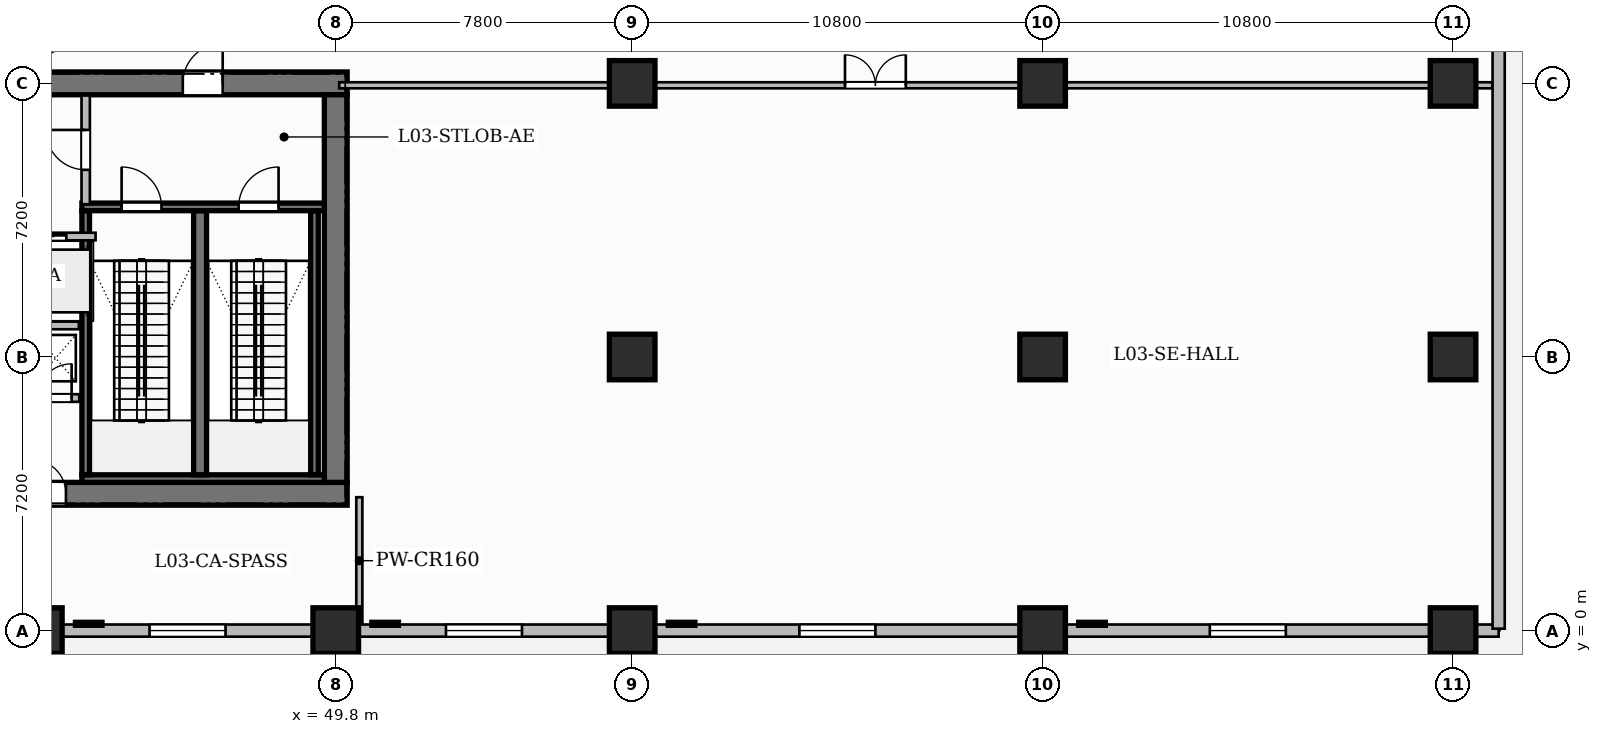
"""IFC4 building model, lengths in metres.
Left out: names, types, materials, properties, quantities, classifications, styles, units other than length and angle.
Written with IfcOpenShell. Run it as: python <this file> out.ifc"""

import sys

from ifc_helpers import new_model, si_unit, direction, frame, frame_2d, origin, origin_2d, place, context, subcontext, project, spatial, rectangle, extrude, source, transform, mapped, element, fill, save


model = new_model("IFC4")
c1 = context("Model", 3, precision=1e-05, world=origin(), true_north=direction((0.0, 1.0)))
c2 = subcontext(c1, "Body", "Model", "MODEL_VIEW")
j1 = project(units=[si_unit("LENGTHUNIT", "METRE"), si_unit("PLANEANGLEUNIT", "RADIAN")], contexts=[c1])
p1 = place(None, origin())
s1 = spatial("IfcSite", under=j1, at=p1, CompositionType="ELEMENT")
p2 = place(p1, origin())
s2 = spatial("IfcBuilding", under=s1, at=p2, CompositionType="ELEMENT")
p3 = place(p2, frame((0.0, 0.0, 16.2)))
s3 = spatial("IfcBuildingStorey", under=s2, at=p3, CompositionType="ELEMENT", Elevation=16.2)
p4 = place(p3, frame((34.5, 3.6, 0.0), z_axis=(0.0, 0.0, 1.0), x_axis=(1.0, 0.0, 0.0)))
e1 = element("IfcWall", 1, at=p4, inside=s3, PredefinedType="SHEAR", context=c2, shape_type="SweptSolid", body=[
    extrude(rectangle(XDim=15.6, YDim=0.6, at=frame_2d((7.8, 0.0))), origin(), (0.0, 0.0, 1.0), 5.4),
])
p5 = place(p4, frame((4.13, 0.0, 0.0)))
e2 = element("IfcOpeningElement", 2, at=p5, cuts=e1, PredefinedType="OPENING", context=c2, shape_type="SweptSolid", body=[
    extrude(rectangle(XDim=0.9, YDim=2.1, at=frame_2d((0.45, 1.05))), frame((0.0, 0.31, 0.0), z_axis=(0.0, -1.0, 0.0), x_axis=(1.0, 0.0, 0.0)), (0.0, 0.0, 1.0), 0.62),
])
p6 = place(p4, frame((5.7, 0.0, 0.0)))
e3 = element("IfcOpeningElement", 3, at=p6, cuts=e1, PredefinedType="OPENING", context=c2, shape_type="SweptSolid", body=[
    extrude(rectangle(XDim=0.9, YDim=2.1, at=frame_2d((0.45, 1.05))), frame((0.0, 0.31, 0.0), z_axis=(0.0, -1.0, 0.0), x_axis=(1.0, 0.0, 0.0)), (0.0, 0.0, 1.0), 0.62),
])
p7 = place(p4, frame((7.3, 0.0, 0.0)))
e4 = element("IfcOpeningElement", 4, at=p7, cuts=e1, PredefinedType="OPENING", context=c2, shape_type="SweptSolid", body=[
    extrude(rectangle(XDim=0.9, YDim=2.1, at=frame_2d((0.45, 1.05))), frame((0.0, 0.31, 0.0), z_axis=(0.0, -1.0, 0.0), x_axis=(1.0, 0.0, 0.0)), (0.0, 0.0, 1.0), 0.62),
])
p8 = place(p3, frame((34.5, 14.4, 0.0), z_axis=(0.0, 0.0, 1.0), x_axis=(1.0, 0.0, 0.0)))
e5 = element("IfcWall", 5, at=p8, inside=s3, PredefinedType="SHEAR", context=c2, shape_type="SweptSolid", body=[
    extrude(rectangle(XDim=15.6, YDim=0.6, at=frame_2d((7.8, 0.0))), origin(), (0.0, 0.0, 1.0), 5.4),
])
p9 = place(p8, frame((5.43, 0.0, 0.0)))
e6 = element("IfcOpeningElement", 6, at=p9, cuts=e5, PredefinedType="OPENING", context=c2, shape_type="SweptSolid", body=[
    extrude(rectangle(XDim=1.5, YDim=2.2, at=frame_2d((0.75, 1.1))), frame((0.0, 0.31, 0.0), z_axis=(0.0, -1.0, 0.0), x_axis=(1.0, 0.0, 0.0)), (0.0, 0.0, 1.0), 0.62),
])
p10 = place(p8, frame((1.645, 0.0, 0.0)))
e7 = element("IfcOpeningElement", 7, at=p10, cuts=e5, PredefinedType="OPENING", context=c2, shape_type="SweptSolid", body=[
    extrude(rectangle(XDim=1.05, YDim=2.15, at=frame_2d((0.525, 1.075))), frame((0.0, 0.31, 0.0), z_axis=(0.0, -1.0, 0.0), x_axis=(1.0, 0.0, 0.0)), (0.0, 0.0, 1.0), 0.62),
])
p11 = place(p8, frame((11.275, 0.0, 0.0)))
e8 = element("IfcOpeningElement", 8, at=p11, cuts=e5, PredefinedType="OPENING", context=c2, shape_type="SweptSolid", body=[
    extrude(rectangle(XDim=1.05, YDim=2.15, at=frame_2d((0.525, 1.075))), frame((0.0, 0.31, 0.0), z_axis=(0.0, -1.0, 0.0), x_axis=(1.0, 0.0, 0.0)), (0.0, 0.0, 1.0), 0.62),
])
p12 = place(p3, frame((49.8, 3.9, 0.0), z_axis=(0.0, 0.0, 1.0), x_axis=(0.0, 1.0, 0.0)))
e9 = element("IfcWall", 9, at=p12, inside=s3, PredefinedType="SHEAR", context=c2, shape_type="SweptSolid", body=[
    extrude(rectangle(XDim=10.2, YDim=0.6, at=frame_2d((5.1, 0.0))), origin(), (0.0, 0.0, 1.0), 5.4),
])
m1 = source(origin(), c2, "Body", "SweptSolid", [
    extrude(rectangle(XDim=1.2, YDim=1.2, at=origin_2d()), origin(), (0.0, 0.0, 1.0), 5.4),
])
for number, where, z_axis, x_axis in (
    (10, (42.0, 0.0, 0.0), (0.0, 0.0, 1.0), (1.0, 0.0, 0.0)),
    (11, (49.8, 0.0, 0.0), (0.0, 0.0, 1.0), (1.0, 0.0, 0.0)),
    (12, (57.6, 0.0, 0.0), (0.0, 0.0, 1.0), (1.0, 0.0, 0.0)),
    (13, (57.6, 7.2, 0.0), (0.0, 0.0, 1.0), (1.0, 0.0, 0.0)),
    (14, (57.6, 14.4, 0.0), (0.0, 0.0, 1.0), (1.0, 0.0, 0.0)),
    (15, (68.4, 0.0, 0.0), (0.0, 0.0, 1.0), (1.0, 0.0, 0.0)),
    (16, (68.4, 7.2, 0.0), (0.0, 0.0, 1.0), (1.0, 0.0, 0.0)),
    (17, (68.4, 14.4, 0.0), (0.0, 0.0, 1.0), (1.0, 0.0, 0.0)),
    (18, (79.2, 0.0, 0.0), (0.0, 0.0, 1.0), (1.0, 0.0, 0.0)),
    (19, (79.2, 7.2, 0.0), (0.0, 0.0, 1.0), (1.0, 0.0, 0.0)),
    (20, (79.2, 14.4, 0.0), (0.0, 0.0, 1.0), (1.0, 0.0, 0.0)),
):
    element("IfcColumn", number, at=place(p3, frame(where, z_axis=z_axis, x_axis=x_axis)), inside=s3, PredefinedType="COLUMN", context=c2, shape_type="MappedRepresentation", body=[
        mapped(m1, transform((0.0, 0.0, 0.0), scale=1.0)),
    ])
p13 = place(p3, frame((43.12, 4.0, 0.0), z_axis=(0.0, 0.0, 1.0), x_axis=(1.0, 0.0, 0.0)))
e21 = element("IfcWall", 21, at=p13, inside=s3, PredefinedType="SHEAR", context=c2, shape_type="SweptSolid", body=[
    extrude(rectangle(XDim=6.38, YDim=0.2, at=frame_2d((3.19, 0.0))), origin(), (0.0, 0.0, 1.0), 5.4),
])
p14 = place(p3, frame((43.22, 4.1, 0.0), z_axis=(0.0, 0.0, 1.0), x_axis=(0.0, 1.0, 0.0)))
e22 = element("IfcWall", 22, at=p14, inside=s3, PredefinedType="SHEAR", context=c2, shape_type="SweptSolid", body=[
    extrude(rectangle(XDim=6.95, YDim=0.2, at=frame_2d((3.475, 0.0))), origin(), (0.0, 0.0, 1.0), 5.4),
])
p15 = place(p3, frame((46.23, 4.1, 0.0), z_axis=(0.0, 0.0, 1.0), x_axis=(0.0, 1.0, 0.0)))
e23 = element("IfcWall", 23, at=p15, inside=s3, PredefinedType="SHEAR", context=c2, shape_type="SweptSolid", body=[
    extrude(rectangle(XDim=6.95, YDim=0.34, at=frame_2d((3.475, 0.0))), origin(), (0.0, 0.0, 1.0), 5.4),
])
p16 = place(p3, frame((49.24, 4.1, 0.0), z_axis=(0.0, 0.0, 1.0), x_axis=(0.0, 1.0, 0.0)))
e24 = element("IfcWall", 24, at=p16, inside=s3, PredefinedType="SHEAR", context=c2, shape_type="SweptSolid", body=[
    extrude(rectangle(XDim=6.95, YDim=0.2, at=frame_2d((3.475, 0.0))), origin(), (0.0, 0.0, 1.0), 5.4),
])
p17 = place(p3, frame((43.12, 11.15, 0.0), z_axis=(0.0, 0.0, 1.0), x_axis=(1.0, 0.0, 0.0)))
e25 = element("IfcWall", 25, at=p17, inside=s3, PredefinedType="SHEAR", context=c2, shape_type="SweptSolid", body=[
    extrude(rectangle(XDim=6.38, YDim=0.2, at=frame_2d((3.19, 0.0))), origin(), (0.0, 0.0, 1.0), 5.4),
])
p18 = place(p17, frame((1.045, 0.0, 0.0)))
e26 = element("IfcOpeningElement", 26, at=p18, cuts=e25, PredefinedType="OPENING", context=c2, shape_type="SweptSolid", body=[
    extrude(rectangle(XDim=1.05, YDim=2.2, at=frame_2d((0.525, 1.1))), frame((0.0, 0.11, 0.0), z_axis=(0.0, -1.0, 0.0), x_axis=(1.0, 0.0, 0.0)), (0.0, 0.0, 1.0), 0.22),
])
p19 = place(p17, frame((4.125, 0.0, 0.0)))
e27 = element("IfcOpeningElement", 27, at=p19, cuts=e25, PredefinedType="OPENING", context=c2, shape_type="SweptSolid", body=[
    extrude(rectangle(XDim=1.05, YDim=2.2, at=frame_2d((0.525, 1.1))), frame((0.0, 0.11, 0.0), z_axis=(0.0, -1.0, 0.0), x_axis=(1.0, 0.0, 0.0)), (0.0, 0.0, 1.0), 0.22),
])
p20 = place(p3, frame((38.3, 8.03, 0.0), z_axis=(0.0, 0.0, 1.0), x_axis=(1.0, 0.0, 0.0)))
e28 = element("IfcWall", 28, at=p20, inside=s3, PredefinedType="PARTITIONING", context=c2, shape_type="SweptSolid", body=[
    extrude(rectangle(XDim=4.74, YDim=0.2, at=frame_2d((2.37, 0.0))), origin(), (0.0, 0.0, 1.0), 5.1),
])
p21 = place(p3, frame((43.22, 11.22, 0.0), z_axis=(0.0, 0.0, 1.0), x_axis=(0.0, 1.0, 0.0)))
e29 = element("IfcWall", 29, at=p21, inside=s3, PredefinedType="PARTITIONING", context=c2, shape_type="SweptSolid", body=[
    extrude(rectangle(XDim=2.86, YDim=0.22, at=frame_2d((1.43, 0.0))), origin(), (0.0, 0.0, 1.0), 5.1),
])
p22 = place(p21, frame((0.905, 0.0, 0.0)))
e30 = element("IfcOpeningElement", 30, at=p22, cuts=e29, PredefinedType="OPENING", context=c2, shape_type="SweptSolid", body=[
    extrude(rectangle(XDim=1.05, YDim=2.15, at=frame_2d((0.525, 1.075))), frame((0.0, 0.12, 0.0), z_axis=(0.0, -1.0, 0.0), x_axis=(1.0, 0.0, 0.0)), (0.0, 0.0, 1.0), 0.24),
])
p23 = place(p3, frame((41.73, 6.12, 0.0), z_axis=(0.0, 0.0, 1.0), x_axis=(1.0, 0.0, 0.0)))
e31 = element("IfcWall", 31, at=p23, inside=s3, PredefinedType="PARTITIONING", context=c2, shape_type="SweptSolid", body=[
    extrude(rectangle(XDim=1.32, YDim=0.2, at=frame_2d((0.66, 0.0))), origin(), (0.0, 0.0, 1.0), 5.1),
])
p24 = place(p23, frame((0.22, 0.0, 0.0)))
e32 = element("IfcOpeningElement", 32, at=p24, cuts=e31, PredefinedType="OPENING", context=c2, shape_type="SweptSolid", body=[
    extrude(rectangle(XDim=0.9, YDim=2.1, at=frame_2d((0.45, 1.05))), frame((0.0, 0.11, 0.0), z_axis=(0.0, -1.0, 0.0), x_axis=(1.0, 0.0, 0.0)), (0.0, 0.0, 1.0), 0.22),
])
p25 = place(p3, frame((49.89, 14.35, 0.0), z_axis=(0.0, 0.0, 1.0), x_axis=(1.0, 0.0, 0.0)))
e33 = element("IfcWall", 33, at=p25, inside=s3, PredefinedType="PARTITIONING", context=c2, shape_type="SweptSolid", body=[
    extrude(rectangle(XDim=30.342, YDim=0.16, at=frame_2d((15.171, 0.0))), origin(), (0.0, 0.0, 1.0), 4.185),
])
p26 = place(p25, frame((13.31, 0.0, 0.0)))
e34 = element("IfcOpeningElement", 34, at=p26, cuts=e33, PredefinedType="OPENING", context=c2, shape_type="SweptSolid", body=[
    extrude(rectangle(XDim=1.6, YDim=2.4, at=frame_2d((0.8, 1.2))), frame((0.0, 0.09, 0.0), z_axis=(0.0, -1.0, 0.0), x_axis=(1.0, 0.0, 0.0)), (0.0, 0.0, 1.0), 0.18),
])
p27 = place(p3, frame((50.42, 0.168, 0.0), z_axis=(0.0, 0.0, 1.0), x_axis=(0.0, 1.0, 0.0)))
e35 = element("IfcWall", 35, at=p27, inside=s3, PredefinedType="PARTITIONING", context=c2, shape_type="SweptSolid", body=[
    extrude(rectangle(XDim=3.342, YDim=0.16, at=frame_2d((1.671, 0.0))), origin(), (0.0, 0.0, 1.0), 5.1),
])
p28 = place(p3, frame((40.84, 10.37, 0.0), z_axis=(0.0, 0.0, 1.0), x_axis=(1.0, 0.0, 0.0)))
e36 = element("IfcWall", 36, at=p28, inside=s3, PredefinedType="PARTITIONING", context=c2, shape_type="SweptSolid", body=[
    extrude(rectangle(XDim=2.64, YDim=0.2, at=frame_2d((1.32, 0.0))), origin(), (0.0, 0.0, 1.0), 5.1),
])
p29 = place(p28, frame((0.77, 0.0, 0.0)))
e37 = element("IfcOpeningElement", 37, at=p29, cuts=e36, PredefinedType="OPENING", context=c2, shape_type="SweptSolid", body=[
    extrude(rectangle(XDim=1.1, YDim=2.2, at=frame_2d((0.55, 1.1))), frame((0.0, 0.11, 0.0), z_axis=(0.0, -1.0, 0.0), x_axis=(1.0, 0.0, 0.0)), (0.0, 0.0, 1.0), 0.22),
])
p30 = place(p3, frame((-4.8, 0.0, 0.0), z_axis=(0.0, 0.0, 1.0), x_axis=(1.0, 0.0, 0.0)))
e38 = element("IfcWall", 38, at=p30, inside=s3, PredefinedType="SOLIDWALL", context=c2, shape_type="SweptSolid", body=[
    extrude(rectangle(XDim=85.2, YDim=0.32, at=frame_2d((42.6, 0.0))), origin(), (0.0, 0.0, 1.0), 4.185),
])
p31 = place(p30, frame((1.4, 0.0, 0.75)))
e39 = element("IfcOpeningElement", 39, at=p31, cuts=e38, PredefinedType="OPENING", context=c2, shape_type="SweptSolid", body=[
    extrude(rectangle(XDim=2.0, YDim=2.6, at=frame_2d((1.0, 1.3))), frame((0.0, 0.17, 0.0), z_axis=(0.0, -1.0, 0.0), x_axis=(1.0, 0.0, 0.0)), (0.0, 0.0, 1.0), 0.34),
])
p32 = place(p30, frame((7.4, 0.0, 0.75)))
e40 = element("IfcOpeningElement", 40, at=p32, cuts=e38, PredefinedType="OPENING", context=c2, shape_type="SweptSolid", body=[
    extrude(rectangle(XDim=2.0, YDim=2.6, at=frame_2d((1.0, 1.3))), frame((0.0, 0.17, 0.0), z_axis=(0.0, -1.0, 0.0), x_axis=(1.0, 0.0, 0.0)), (0.0, 0.0, 1.0), 0.34),
])
p33 = place(p30, frame((14.6, 0.0, 0.75)))
e41 = element("IfcOpeningElement", 41, at=p33, cuts=e38, PredefinedType="OPENING", context=c2, shape_type="SweptSolid", body=[
    extrude(rectangle(XDim=2.0, YDim=2.6, at=frame_2d((1.0, 1.3))), frame((0.0, 0.17, 0.0), z_axis=(0.0, -1.0, 0.0), x_axis=(1.0, 0.0, 0.0)), (0.0, 0.0, 1.0), 0.34),
])
p34 = place(p30, frame((21.8, 0.0, 0.75)))
e42 = element("IfcOpeningElement", 42, at=p34, cuts=e38, PredefinedType="OPENING", context=c2, shape_type="SweptSolid", body=[
    extrude(rectangle(XDim=2.0, YDim=2.6, at=frame_2d((1.0, 1.3))), frame((0.0, 0.17, 0.0), z_axis=(0.0, -1.0, 0.0), x_axis=(1.0, 0.0, 0.0)), (0.0, 0.0, 1.0), 0.34),
])
p35 = place(p30, frame((29.0, 0.0, 0.75)))
e43 = element("IfcOpeningElement", 43, at=p35, cuts=e38, PredefinedType="OPENING", context=c2, shape_type="SweptSolid", body=[
    extrude(rectangle(XDim=2.0, YDim=2.6, at=frame_2d((1.0, 1.3))), frame((0.0, 0.17, 0.0), z_axis=(0.0, -1.0, 0.0), x_axis=(1.0, 0.0, 0.0)), (0.0, 0.0, 1.0), 0.34),
])
p36 = place(p30, frame((35.6, 0.0, 0.75)))
e44 = element("IfcOpeningElement", 44, at=p36, cuts=e38, PredefinedType="OPENING", context=c2, shape_type="SweptSolid", body=[
    extrude(rectangle(XDim=2.0, YDim=2.6, at=frame_2d((1.0, 1.3))), frame((0.0, 0.17, 0.0), z_axis=(0.0, -1.0, 0.0), x_axis=(1.0, 0.0, 0.0)), (0.0, 0.0, 1.0), 0.34),
])
p37 = place(p30, frame((42.2, 0.0, 0.75)))
e45 = element("IfcOpeningElement", 45, at=p37, cuts=e38, PredefinedType="OPENING", context=c2, shape_type="SweptSolid", body=[
    extrude(rectangle(XDim=2.0, YDim=2.6, at=frame_2d((1.0, 1.3))), frame((0.0, 0.17, 0.0), z_axis=(0.0, -1.0, 0.0), x_axis=(1.0, 0.0, 0.0)), (0.0, 0.0, 1.0), 0.34),
])
p38 = place(p30, frame((49.7, 0.0, 0.75)))
e46 = element("IfcOpeningElement", 46, at=p38, cuts=e38, PredefinedType="OPENING", context=c2, shape_type="SweptSolid", body=[
    extrude(rectangle(XDim=2.0, YDim=2.6, at=frame_2d((1.0, 1.3))), frame((0.0, 0.17, 0.0), z_axis=(0.0, -1.0, 0.0), x_axis=(1.0, 0.0, 0.0)), (0.0, 0.0, 1.0), 0.34),
])
p39 = place(p30, frame((57.5, 0.0, 0.75)))
e47 = element("IfcOpeningElement", 47, at=p39, cuts=e38, PredefinedType="OPENING", context=c2, shape_type="SweptSolid", body=[
    extrude(rectangle(XDim=2.0, YDim=2.6, at=frame_2d((1.0, 1.3))), frame((0.0, 0.17, 0.0), z_axis=(0.0, -1.0, 0.0), x_axis=(1.0, 0.0, 0.0)), (0.0, 0.0, 1.0), 0.34),
])
p40 = place(p30, frame((66.8, 0.0, 0.75)))
e48 = element("IfcOpeningElement", 48, at=p40, cuts=e38, PredefinedType="OPENING", context=c2, shape_type="SweptSolid", body=[
    extrude(rectangle(XDim=2.0, YDim=2.6, at=frame_2d((1.0, 1.3))), frame((0.0, 0.17, 0.0), z_axis=(0.0, -1.0, 0.0), x_axis=(1.0, 0.0, 0.0)), (0.0, 0.0, 1.0), 0.34),
])
p41 = place(p30, frame((77.6, 0.0, 0.75)))
e49 = element("IfcOpeningElement", 49, at=p41, cuts=e38, PredefinedType="OPENING", context=c2, shape_type="SweptSolid", body=[
    extrude(rectangle(XDim=2.0, YDim=2.6, at=frame_2d((1.0, 1.3))), frame((0.0, 0.17, 0.0), z_axis=(0.0, -1.0, 0.0), x_axis=(1.0, 0.0, 0.0)), (0.0, 0.0, 1.0), 0.34),
])
p42 = place(p3, frame((80.4, 0.05, 0.0), z_axis=(0.0, 0.0, 1.0), x_axis=(0.0, 1.0, 0.0)))
e50 = element("IfcWall", 50, at=p42, inside=s3, PredefinedType="SOLIDWALL", context=c2, shape_type="SweptSolid", body=[
    extrude(rectangle(XDim=46.7, YDim=0.32, at=frame_2d((23.35, 0.0))), origin(), (0.0, 0.0, 1.0), 5.1),
])
p43 = place(p42, frame((22.35, 0.0, 0.75)))
e51 = element("IfcOpeningElement", 51, at=p43, cuts=e50, PredefinedType="OPENING", context=c2, shape_type="SweptSolid", body=[
    extrude(rectangle(XDim=2.0, YDim=2.6, at=frame_2d((1.0, 1.3))), frame((0.0, 0.17, 0.0), z_axis=(0.0, -1.0, 0.0), x_axis=(1.0, 0.0, 0.0)), (0.0, 0.0, 1.0), 0.34),
])
m2 = source(origin(), c2, "Body", "SweptSolid", [
    extrude(rectangle(XDim=1.05, YDim=2.2, at=frame_2d((0.525, 1.1))), frame((0.0, 0.025, 0.0), z_axis=(0.0, -1.0, 0.0), x_axis=(1.0, 0.0, 0.0)), (0.0, 0.0, 1.0), 0.05),
])
p44 = place(p18, origin())
e52 = element("IfcDoor", 52, at=p44, inside=s3, OperationType="SINGLE_SWING_LEFT", PredefinedType="DOOR", context=c2, shape_type="MappedRepresentation", body=[
    mapped(m2, transform((0.0, 0.0, 0.0), scale=1.0)),
])
fill(e26, e52)
p45 = place(p19, origin())
e53 = element("IfcDoor", 53, at=p45, inside=s3, OperationType="SINGLE_SWING_RIGHT", PredefinedType="DOOR", context=c2, shape_type="MappedRepresentation", body=[
    mapped(m2, transform((0.0, 0.0, 0.0), scale=1.0)),
])
fill(e27, e53)
m3 = source(origin(), c2, "Body", "SweptSolid", [
    extrude(rectangle(XDim=1.05, YDim=2.15, at=frame_2d((0.525, 1.075))), frame((0.0, 0.025, 0.0), z_axis=(0.0, -1.0, 0.0), x_axis=(1.0, 0.0, 0.0)), (0.0, 0.0, 1.0), 0.05),
])
p46 = place(p22, origin())
e54 = element("IfcDoor", 54, at=p46, inside=s3, OperationType="SINGLE_SWING_RIGHT", PredefinedType="DOOR", context=c2, shape_type="MappedRepresentation", body=[
    mapped(m3, transform((0.0, 0.0, 0.0), scale=1.0)),
])
fill(e30, e54)
p47 = place(p11, origin())
e55 = element("IfcDoor", 55, at=p47, inside=s3, OperationType="SINGLE_SWING_RIGHT", PredefinedType="DOOR", context=c2, shape_type="MappedRepresentation", body=[
    mapped(m3, transform((0.0, 0.0, 0.0), scale=1.0)),
])
fill(e8, e55)
m4 = source(origin(), c2, "Body", "SweptSolid", [
    extrude(rectangle(XDim=0.9, YDim=2.1, at=frame_2d((0.45, 1.05))), frame((0.0, 0.025, 0.0), z_axis=(0.0, -1.0, 0.0), x_axis=(1.0, 0.0, 0.0)), (0.0, 0.0, 1.0), 0.05),
])
p48 = place(p24, origin())
e56 = element("IfcDoor", 56, at=p48, inside=s3, OperationType="SINGLE_SWING_RIGHT", PredefinedType="DOOR", context=c2, shape_type="MappedRepresentation", body=[
    mapped(m4, transform((0.0, 0.0, 0.0), scale=1.0)),
])
fill(e32, e56)
p49 = place(p7, origin())
e57 = element("IfcDoor", 57, at=p49, inside=s3, OperationType="SINGLE_SWING_LEFT", PredefinedType="DOOR", context=c2, shape_type="MappedRepresentation", body=[
    mapped(m4, transform((0.0, 0.0, 0.0), scale=1.0)),
])
fill(e4, e57)
m5 = source(origin(), c2, "Body", "SweptSolid", [
    extrude(rectangle(XDim=1.6, YDim=2.4, at=frame_2d((0.8, 1.2))), frame((0.0, 0.025, 0.0), z_axis=(0.0, -1.0, 0.0), x_axis=(1.0, 0.0, 0.0)), (0.0, 0.0, 1.0), 0.05),
])
p50 = place(p26, origin())
e58 = element("IfcDoor", 58, at=p50, inside=s3, OperationType="DOUBLE_DOOR_SINGLE_SWING", PredefinedType="DOOR", context=c2, shape_type="MappedRepresentation", body=[
    mapped(m5, transform((0.0, 0.0, 0.0), scale=1.0)),
])
fill(e34, e58)
m6 = source(origin(), c2, "Body", "SweptSolid", [
    extrude(rectangle(XDim=1.1, YDim=2.2, at=frame_2d((0.55, 1.1))), frame((0.0, 0.025, 0.0), z_axis=(0.0, -1.0, 0.0), x_axis=(1.0, 0.0, 0.0)), (0.0, 0.0, 1.0), 0.05),
])
p51 = place(p29, origin())
e59 = element("IfcDoor", 59, at=p51, inside=s3, OperationType="SLIDING_TO_LEFT", PredefinedType="DOOR", context=c2, shape_type="MappedRepresentation", body=[
    mapped(m6, transform((0.0, 0.0, 0.0), scale=1.0)),
])
fill(e37, e59)
m7 = source(origin(), c2, "Body", "SweptSolid", [
    extrude(rectangle(XDim=2.0, YDim=2.6, at=frame_2d((1.0, 1.3))), frame((0.0, 0.03, 0.0), z_axis=(0.0, -1.0, 0.0), x_axis=(1.0, 0.0, 0.0)), (0.0, 0.0, 1.0), 0.06),
])
p52 = place(p38, origin())
e60 = element("IfcWindow", 60, at=p52, inside=s3, PartitioningType="DOUBLE_PANEL_VERTICAL", PredefinedType="WINDOW", context=c2, shape_type="MappedRepresentation", body=[
    mapped(m7, transform((0.0, 0.0, 0.0), scale=1.0)),
])
fill(e46, e60)
p53 = place(p39, origin())
e61 = element("IfcWindow", 61, at=p53, inside=s3, PartitioningType="DOUBLE_PANEL_VERTICAL", PredefinedType="WINDOW", context=c2, shape_type="MappedRepresentation", body=[
    mapped(m7, transform((0.0, 0.0, 0.0), scale=1.0)),
])
fill(e47, e61)
p54 = place(p40, origin())
e62 = element("IfcWindow", 62, at=p54, inside=s3, PartitioningType="DOUBLE_PANEL_VERTICAL", PredefinedType="WINDOW", context=c2, shape_type="MappedRepresentation", body=[
    mapped(m7, transform((0.0, 0.0, 0.0), scale=1.0)),
])
fill(e48, e62)
p55 = place(p41, origin())
e63 = element("IfcWindow", 63, at=p55, inside=s3, PartitioningType="DOUBLE_PANEL_VERTICAL", PredefinedType="WINDOW", context=c2, shape_type="MappedRepresentation", body=[
    mapped(m7, transform((0.0, 0.0, 0.0), scale=1.0)),
])
fill(e49, e63)
save(model, sys.argv[1])
